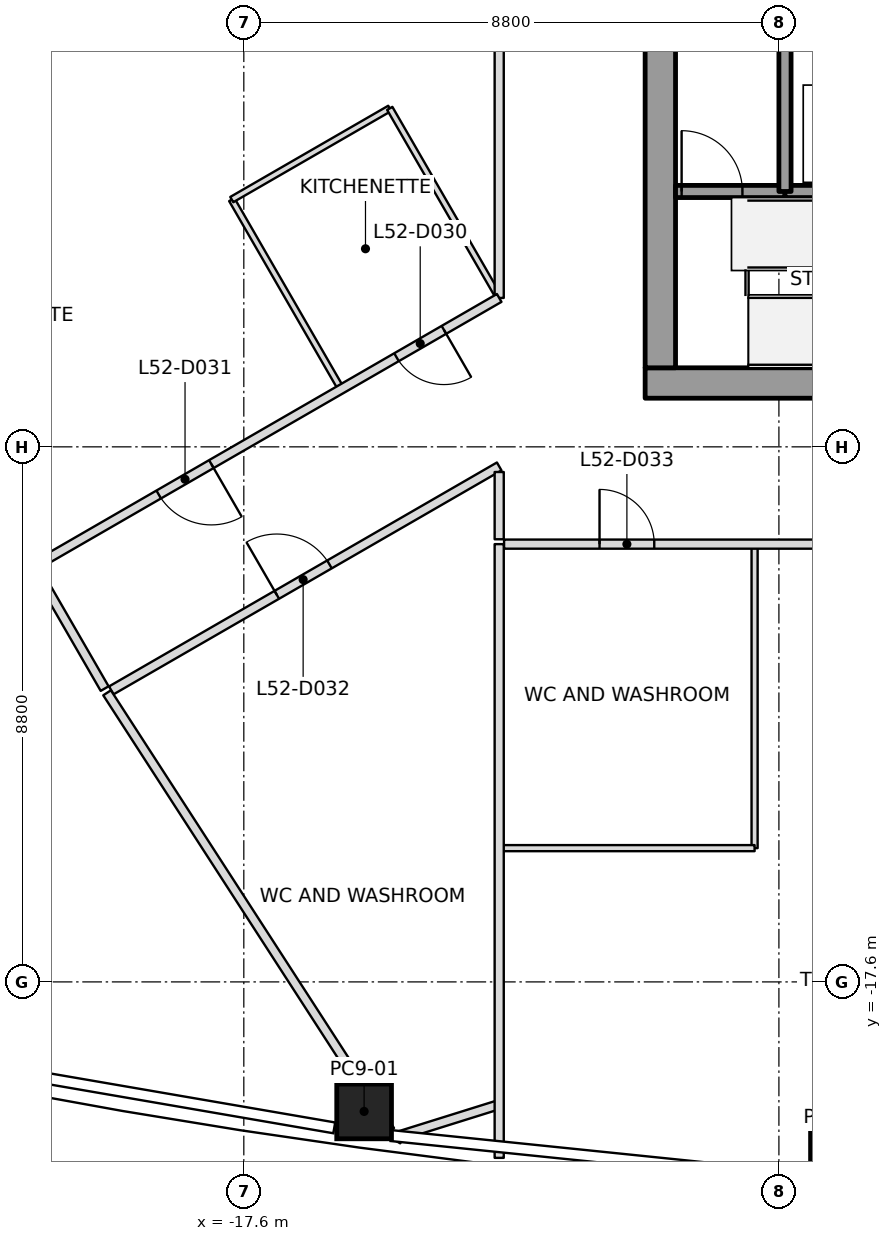
"""IFC4 building model, lengths in metres.
Left out: names, types, materials, properties, quantities, classifications, styles, units other than length and angle.
Written with IfcOpenShell. Run it as: python <this file> out.ifc"""

import sys

from ifc_helpers import new_model, si_unit, direction, frame, frame_2d, origin, origin_2d, place, context, subcontext, project, spatial, rectangle, extrude, element, fill, save


model = new_model("IFC4")
c1 = context("Model", 3, precision=1e-05, world=origin(), true_north=direction((0.0, 1.0)))
c2 = subcontext(c1, "Body", "Model", "MODEL_VIEW")
j1 = project(units=[si_unit("LENGTHUNIT", "METRE"), si_unit("PLANEANGLEUNIT", "RADIAN")], contexts=[c1])
p1 = place(None, origin())
s1 = spatial("IfcSite", under=j1, at=p1, CompositionType="ELEMENT")
p2 = place(p1, origin())
s2 = spatial("IfcBuilding", under=s1, at=p2, CompositionType="ELEMENT")
p3 = place(p2, frame((0.0, 0.0, 235.0)))
s3 = spatial("IfcBuildingStorey", under=s2, at=p3, CompositionType="ELEMENT", Elevation=235.0)
p4 = place(p3, frame((-15.622, -19.73, 0.0), z_axis=(0.017513460473, 0.010373826761, 0.999792809746), x_axis=(-0.990562226516, 0.136133815888, 0.015939246235)))
e1 = element("IfcColumn", 1, at=p4, inside=s3, PredefinedType="COLUMN", context=c2, shape_type="SweptSolid", body=[
    extrude(rectangle(XDim=0.9, YDim=0.9, at=origin_2d()), origin(), (0.0, 0.0, 1.0), 4.001),
])
p5 = place(p3, frame((-7.829, -20.53, 0.0), z_axis=(0.008788174922, 0.01116830563, 0.999899013366), x_axis=(-0.997637315828, 0.06823259627, 0.008006177268)))
e2 = element("IfcColumn", 2, at=p5, inside=s3, PredefinedType="COLUMN", context=c2, shape_type="SweptSolid", body=[
    extrude(rectangle(XDim=0.9, YDim=0.9, at=origin_2d()), origin(), (0.0, 0.0, 1.0), 4.0),
])
p6 = place(p3, frame((-11.0, -7.75, 0.0), z_axis=(0.0, 0.0, 1.0), x_axis=(1.0, 0.0, 0.0)))
e3 = element("IfcWall", 3, at=p6, inside=s3, PredefinedType="SHEAR", context=c2, shape_type="SweptSolid", body=[
    extrude(rectangle(XDim=22.0, YDim=0.5, at=frame_2d((11.0, 0.0))), origin(), (0.0, 0.0, 1.0), 4.0),
])
p7 = place(p6, frame((10.45, 0.0, 0.0)))
e4 = element("IfcOpeningElement", 4, at=p7, cuts=e3, PredefinedType="OPENING", context=c2, shape_type="SweptSolid", body=[
    extrude(rectangle(XDim=1.1, YDim=2.1, at=frame_2d((0.55, 1.05))), frame((0.0, 0.25, 0.0), z_axis=(0.0, -1.0, 0.0), x_axis=(1.0, 0.0, 0.0)), (0.0, 0.0, 1.0), 0.5),
])
p8 = place(p3, frame((-10.75, -7.5, 0.0), z_axis=(0.0, 0.0, 1.0), x_axis=(0.0, 1.0, 0.0)))
e5 = element("IfcWall", 5, at=p8, inside=s3, PredefinedType="SHEAR", context=c2, shape_type="SweptSolid", body=[
    extrude(rectangle(XDim=15.0, YDim=0.5, at=frame_2d((7.5, 0.0))), origin(), (0.0, 0.0, 1.0), 4.0),
])
p9 = place(p8, frame((6.6, 0.0, 0.0)))
e6 = element("IfcOpeningElement", 6, at=p9, cuts=e5, PredefinedType="OPENING", context=c2, shape_type="SweptSolid", body=[
    extrude(rectangle(XDim=1.8, YDim=2.1, at=frame_2d((0.9, 1.05))), frame((0.0, 0.25, 0.0), z_axis=(0.0, -1.0, 0.0), x_axis=(1.0, 0.0, 0.0)), (0.0, 0.0, 1.0), 0.5),
])
p10 = place(p3, frame((-10.5, -4.6, 0.0), z_axis=(0.0, 0.0, 1.0), x_axis=(1.0, 0.0, 0.0)))
e7 = element("IfcWall", 7, at=p10, inside=s3, PredefinedType="SOLIDWALL", context=c2, shape_type="SweptSolid", body=[
    extrude(rectangle(XDim=1.8, YDim=0.2, at=frame_2d((0.9, 0.0))), origin(), (0.0, 0.0, 1.0), 3.85),
])
p11 = place(p10, frame((0.1, 0.0, 0.0)))
e8 = element("IfcOpeningElement", 8, at=p11, cuts=e7, PredefinedType="OPENING", context=c2, shape_type="SweptSolid", body=[
    extrude(rectangle(XDim=1.0, YDim=2.1, at=frame_2d((0.5, 1.05))), frame((0.0, 0.1, 0.0), z_axis=(0.0, -1.0, 0.0), x_axis=(1.0, 0.0, 0.0)), (0.0, 0.0, 1.0), 0.2),
])
p12 = place(p3, frame((-8.7, -4.6, 0.0), z_axis=(0.0, 0.0, 1.0), x_axis=(1.0, 0.0, 0.0)))
e9 = element("IfcWall", 9, at=p12, inside=s3, PredefinedType="SOLIDWALL", context=c2, shape_type="SweptSolid", body=[
    extrude(rectangle(XDim=2.6, YDim=0.2, at=frame_2d((1.3, 0.0))), origin(), (0.0, 0.0, 1.0), 3.85),
])
p13 = place(p3, frame((-8.7, -4.6, 0.0), z_axis=(0.0, 0.0, 1.0), x_axis=(0.0, 1.0, 0.0)))
e10 = element("IfcWall", 10, at=p13, inside=s3, PredefinedType="SOLIDWALL", context=c2, shape_type="SweptSolid", body=[
    extrude(rectangle(XDim=2.8, YDim=0.2, at=frame_2d((1.4, 0.0))), origin(), (0.0, 0.0, 1.0), 3.85),
])
p14 = place(p3, frame((-19.849, -12.845, 0.0), z_axis=(0.0, 0.0, 1.0), x_axis=(0.543041092905, -0.839706122055, 0.0)))
e11 = element("IfcWall", 11, at=p14, inside=s3, PredefinedType="PARTITIONING", context=c2, shape_type="SweptSolid", body=[
    extrude(rectangle(XDim=8.573, YDim=0.15, at=frame_2d((4.287, 0.0))), origin(), (0.0, 0.0, 1.0), 3.45),
])
p15 = place(p3, frame((-15.043, -20.131, 0.0), z_axis=(0.0, 0.0, 1.0), x_axis=(0.954404246186, 0.298517227076, 0.0)))
e12 = element("IfcWall", 12, at=p15, inside=s3, PredefinedType="PARTITIONING", context=c2, shape_type="SweptSolid", body=[
    extrude(rectangle(XDim=1.722, YDim=0.15, at=frame_2d((0.861, 0.0))), origin(), (0.0, 0.0, 1.0), 3.234),
])
p16 = place(p3, frame((-13.4, -20.494, 0.0), z_axis=(0.0, 0.0, 1.0), x_axis=(0.0, 1.0, 0.0)))
e13 = element("IfcWall", 13, at=p16, inside=s3, PredefinedType="PARTITIONING", context=c2, shape_type="SweptSolid", body=[
    extrude(rectangle(XDim=10.094, YDim=0.15, at=frame_2d((5.047, 0.0))), origin(), (0.0, 0.0, 1.0), 3.234),
])
p17 = place(p3, frame((-15.093, -20.218, 0.0), z_axis=(0.0, 0.0, 1.0), x_axis=(0.500074377092, 0.865982457891, 0.0)))
e14 = element("IfcWall", 14, at=p17, inside=s3, PredefinedType="PARTITIONING", context=c2, shape_type="SweptSolid", body=[
    extrude(rectangle(XDim=0.1, YDim=0.15, at=frame_2d((0.05, 0.0))), origin(), (0.0, 0.0, 1.0), 3.45),
])
p18 = place(p3, frame((-21.009, -10.836, 0.0), z_axis=(0.0, 0.0, 1.0), x_axis=(0.500077830873, -0.865980463445, 0.0)))
e15 = element("IfcWall", 15, at=p18, inside=s3, PredefinedType="PARTITIONING", context=c2, shape_type="SweptSolid", body=[
    extrude(rectangle(XDim=2.24, YDim=0.15, at=frame_2d((1.12, 0.0))), origin(), (0.0, 0.0, 1.0), 3.233),
])
p19 = place(p3, frame((-13.4, 6.351, 0.0), z_axis=(0.0, 0.0, 1.0), x_axis=(0.0, -1.0, 0.0)))
e16 = element("IfcWall", 16, at=p19, inside=s3, PredefinedType="PARTITIONING", context=c2, shape_type="SweptSolid", body=[
    extrude(rectangle(XDim=12.702, YDim=0.15, at=frame_2d((6.351, 0.0))), origin(), (0.0, 0.0, 1.0), 3.317),
])
p20 = place(p3, frame((-13.4, -6.351, 0.0), z_axis=(0.0, 0.0, 1.0), x_axis=(-0.866030434095, -0.499991287145, 0.0)))
e17 = element("IfcWall", 17, at=p20, inside=s3, PredefinedType="PARTITIONING", context=c2, shape_type="SweptSolid", body=[
    extrude(rectangle(XDim=8.752, YDim=0.15, at=frame_2d((4.376, 0.0))), origin(), (0.0, 0.0, 1.0), 3.317),
])
p21 = place(p20, frame((1.05, 0.0, 0.0)))
e18 = element("IfcOpeningElement", 18, at=p21, cuts=e17, PredefinedType="OPENING", context=c2, shape_type="SweptSolid", body=[
    extrude(rectangle(XDim=0.9, YDim=2.1, at=frame_2d((0.45, 1.05))), frame((0.0, 0.075, 0.0), z_axis=(0.0, -1.0, 0.0), x_axis=(1.0, 0.0, 0.0)), (0.0, 0.0, 1.0), 0.15),
])
p22 = place(p20, frame((5.466, 0.0, 0.0)))
e19 = element("IfcOpeningElement", 19, at=p22, cuts=e17, PredefinedType="OPENING", context=c2, shape_type="SweptSolid", body=[
    extrude(rectangle(XDim=1.0, YDim=2.1, at=frame_2d((0.5, 1.05))), frame((0.0, 0.075, 0.0), z_axis=(0.0, -1.0, 0.0), x_axis=(1.0, 0.0, 0.0)), (0.0, 0.0, 1.0), 0.15),
])
p23 = place(p3, frame((-19.78, -12.805, 0.0), z_axis=(0.0, 0.0, 1.0), x_axis=(0.866021670914, 0.500006465466, 0.0)))
e20 = element("IfcWall", 20, at=p23, inside=s3, PredefinedType="PARTITIONING", context=c2, shape_type="SweptSolid", body=[
    extrude(rectangle(XDim=7.367, YDim=0.15, at=frame_2d((3.683, 0.0))), origin(), (0.0, 0.0, 1.0), 3.233),
])
p24 = place(p23, frame((3.143, 0.0, 0.0)))
e21 = element("IfcOpeningElement", 21, at=p24, cuts=e20, PredefinedType="OPENING", context=c2, shape_type="SweptSolid", body=[
    extrude(rectangle(XDim=1.0, YDim=2.1, at=frame_2d((0.5, 1.05))), frame((0.0, 0.075, 0.0), z_axis=(0.0, -1.0, 0.0), x_axis=(1.0, 0.0, 0.0)), (0.0, 0.0, 1.0), 0.15),
])
p25 = place(p3, frame((-13.4, -9.214, 0.0), z_axis=(0.0, 0.0, 1.0), x_axis=(0.0, -1.0, 0.0)))
e22 = element("IfcWall", 22, at=p25, inside=s3, PredefinedType="PARTITIONING", context=c2, shape_type="SweptSolid", body=[
    extrude(rectangle(XDim=1.106, YDim=0.15, at=frame_2d((0.553, 0.0))), origin(), (0.0, 0.0, 1.0), 3.233),
])
p26 = place(p3, frame((-13.32, -10.4, 0.0), z_axis=(0.0, 0.0, 1.0), x_axis=(1.0, 0.0, 0.0)))
e23 = element("IfcWall", 23, at=p26, inside=s3, PredefinedType="PARTITIONING", context=c2, shape_type="SweptSolid", body=[
    extrude(rectangle(XDim=12.12, YDim=0.15, at=frame_2d((6.06, 0.0))), origin(), (0.0, 0.0, 1.0), 3.317),
])
p27 = place(p26, frame((1.57, 0.0, 0.0)))
e24 = element("IfcOpeningElement", 24, at=p27, cuts=e23, PredefinedType="OPENING", context=c2, shape_type="SweptSolid", body=[
    extrude(rectangle(XDim=0.9, YDim=2.1, at=frame_2d((0.45, 1.05))), frame((0.0, 0.075, 0.0), z_axis=(0.0, -1.0, 0.0), x_axis=(1.0, 0.0, 0.0)), (0.0, 0.0, 1.0), 0.15),
])
p28 = place(p26, frame((7.67, 0.0, 0.0)))
e25 = element("IfcOpeningElement", 25, at=p28, cuts=e23, PredefinedType="OPENING", context=c2, shape_type="SweptSolid", body=[
    extrude(rectangle(XDim=1.0, YDim=2.1, at=frame_2d((0.5, 1.05))), frame((0.0, 0.075, 0.0), z_axis=(0.0, -1.0, 0.0), x_axis=(1.0, 0.0, 0.0)), (0.0, 0.0, 1.0), 0.15),
])
p29 = place(p3, frame((-16.013, -7.825, 0.0), z_axis=(0.0, 0.0, 1.0), x_axis=(-0.499971082179, 0.866042098853, 0.0)))
e26 = element("IfcWall", 26, at=p29, inside=s3, PredefinedType="PARTITIONING", context=c2, shape_type="SweptSolid", body=[
    extrude(rectangle(XDim=3.57, YDim=0.1, at=frame_2d((1.785, 0.0))), origin(), (0.0, 0.0, 1.0), 3.317),
])
p30 = place(p3, frame((-17.798, -4.733, 0.0), z_axis=(0.0, 0.0, 1.0), x_axis=(0.866031096941, 0.499990139034, 0.0)))
e27 = element("IfcWall", 27, at=p30, inside=s3, PredefinedType="PARTITIONING", context=c2, shape_type="SweptSolid", body=[
    extrude(rectangle(XDim=3.0, YDim=0.1, at=frame_2d((1.5, 0.0))), origin(), (0.0, 0.0, 1.0), 3.317),
])
p31 = place(p3, frame((-15.2, -3.233, 0.0), z_axis=(0.0, 0.0, 1.0), x_axis=(0.500011000363, -0.866019052629, 0.0)))
e28 = element("IfcWall", 28, at=p31, inside=s3, PredefinedType="PARTITIONING", context=c2, shape_type="SweptSolid", body=[
    extrude(rectangle(XDim=3.54, YDim=0.1, at=frame_2d((1.77, 0.0))), origin(), (0.0, 0.0, 1.0), 3.317),
])
p32 = place(p3, frame((-9.2, -10.43, 0.0), z_axis=(0.0, 0.0, 1.0), x_axis=(0.0, -1.0, 0.0)))
e29 = element("IfcWall", 29, at=p32, inside=s3, PredefinedType="PARTITIONING", context=c2, shape_type="SweptSolid", body=[
    extrude(rectangle(XDim=4.97, YDim=0.1, at=frame_2d((2.485, 0.0))), origin(), (0.0, 0.0, 1.0), 3.45),
])
p33 = place(p3, frame((-9.2, -15.4, 0.0), z_axis=(0.0, 0.0, 1.0), x_axis=(-1.0, 0.0, 0.0)))
e30 = element("IfcWall", 30, at=p33, inside=s3, PredefinedType="PARTITIONING", context=c2, shape_type="SweptSolid", body=[
    extrude(rectangle(XDim=4.17, YDim=0.1, at=frame_2d((2.085, 0.0))), origin(), (0.0, 0.0, 1.0), 3.393),
])
p34 = place(p21, origin())
e31 = element("IfcDoor", 31, at=p34, inside=s3, OperationType="SINGLE_SWING_LEFT", PredefinedType="DOOR", context=c2, shape_type="SweptSolid", body=[
    extrude(rectangle(XDim=0.9, YDim=2.1, at=frame_2d((0.45, 1.05))), frame((0.0, 0.025, 0.0), z_axis=(0.0, -1.0, 0.0), x_axis=(1.0, 0.0, 0.0)), (0.0, 0.0, 1.0), 0.05),
])
fill(e18, e31)
p35 = place(p22, origin())
e32 = element("IfcDoor", 32, at=p35, inside=s3, OperationType="SINGLE_SWING_RIGHT", PredefinedType="DOOR", context=c2, shape_type="SweptSolid", body=[
    extrude(rectangle(XDim=1.0, YDim=2.1, at=frame_2d((0.5, 1.05))), frame((0.0, 0.025, 0.0), z_axis=(0.0, -1.0, 0.0), x_axis=(1.0, 0.0, 0.0)), (0.0, 0.0, 1.0), 0.05),
])
fill(e19, e32)
p36 = place(p24, origin())
e33 = element("IfcDoor", 33, at=p36, inside=s3, OperationType="SINGLE_SWING_LEFT", PredefinedType="DOOR", context=c2, shape_type="SweptSolid", body=[
    extrude(rectangle(XDim=1.0, YDim=2.1, at=frame_2d((0.5, 1.05))), frame((0.0, 0.025, 0.0), z_axis=(0.0, -1.0, 0.0), x_axis=(1.0, 0.0, 0.0)), (0.0, 0.0, 1.0), 0.05),
])
fill(e21, e33)
p37 = place(p27, origin())
e34 = element("IfcDoor", 34, at=p37, inside=s3, OperationType="SINGLE_SWING_LEFT", PredefinedType="DOOR", context=c2, shape_type="SweptSolid", body=[
    extrude(rectangle(XDim=0.9, YDim=2.1, at=frame_2d((0.45, 1.05))), frame((0.0, 0.025, 0.0), z_axis=(0.0, -1.0, 0.0), x_axis=(1.0, 0.0, 0.0)), (0.0, 0.0, 1.0), 0.05),
])
fill(e24, e34)
p38 = place(p11, origin())
e35 = element("IfcDoor", 35, at=p38, inside=s3, OperationType="SINGLE_SWING_LEFT", PredefinedType="DOOR", context=c2, shape_type="SweptSolid", body=[
    extrude(rectangle(XDim=1.0, YDim=2.1, at=frame_2d((0.5, 1.05))), frame((0.0, 0.025, 0.0), z_axis=(0.0, -1.0, 0.0), x_axis=(1.0, 0.0, 0.0)), (0.0, 0.0, 1.0), 0.05),
])
fill(e8, e35)
save(model, sys.argv[1])
